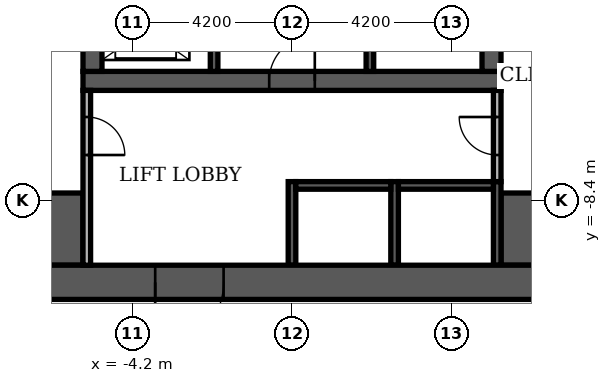
"""IFC4 building model, lengths in metres.
Left out: names, types, materials, properties, quantities, classifications, styles, units other than length and angle.
Written with IfcOpenShell. Run it as: python <this file> out.ifc"""

import sys

from ifc_helpers import new_model, si_unit, direction, frame, frame_2d, origin, place, context, subcontext, project, spatial, rectangle, extrude, element, fill, save


model = new_model("IFC4")
c1 = context("Model", 3, precision=1e-05, world=origin(), true_north=direction((0.0, 1.0)))
c2 = subcontext(c1, "Body", "Model", "MODEL_VIEW")
j1 = project(units=[si_unit("LENGTHUNIT", "METRE"), si_unit("PLANEANGLEUNIT", "RADIAN")], contexts=[c1])
p1 = place(None, origin())
s1 = spatial("IfcSite", under=j1, at=p1, CompositionType="ELEMENT")
p2 = place(p1, origin())
s2 = spatial("IfcBuilding", under=s1, at=p2, CompositionType="ELEMENT")
p3 = place(p2, frame((0.0, 0.0, 16.8)))
s3 = spatial("IfcBuildingStorey", under=s2, at=p3, CompositionType="ELEMENT", Elevation=16.8)
p4 = place(p3, frame((-5.5, -5.25, 0.0), z_axis=(0.0, 0.0, 1.0), x_axis=(1.0, 0.0, 0.0)))
e1 = element("IfcWall", 1, at=p4, inside=s3, PredefinedType="SHEAR", context=c2, shape_type="SweptSolid", body=[
    extrude(rectangle(XDim=11.0, YDim=0.5, at=frame_2d((5.5, 0.0))), origin(), (0.0, 0.0, 1.0), 4.98),
])
p5 = place(p4, frame((4.9, 0.0, 0.0)))
e2 = element("IfcOpeningElement", 2, at=p5, cuts=e1, PredefinedType="OPENING", context=c2, shape_type="SweptSolid", body=[
    extrude(rectangle(XDim=1.2, YDim=2.1, at=frame_2d((0.6, 1.05))), frame((0.0, 0.26, 0.0), z_axis=(0.0, -1.0, 0.0), x_axis=(1.0, 0.0, 0.0)), (0.0, 0.0, 1.0), 0.52),
])
for number, where, z_axis, x_axis in (
    (3, (-5.25, -5.0, 0.0), (0.0, 0.0, 1.0), (0.0, 1.0, 0.0)),
    (4, (5.25, -5.0, 0.0), (0.0, 0.0, 1.0), (0.0, 1.0, 0.0)),
):
    element("IfcWall", number, at=place(p3, frame(where, z_axis=z_axis, x_axis=x_axis)), inside=s3, PredefinedType="SHEAR", context=c2, shape_type="SweptSolid", body=[
        extrude(rectangle(XDim=10.5, YDim=0.5, at=frame_2d((5.25, 0.0))), origin(), (0.0, 0.0, 1.0), 4.98),
    ])
for number, where, z_axis, x_axis in (
    (5, (-10.1, -9.15, 0.0), (0.0, 0.0, 1.0), (1.0, 0.0, 0.0)),
    (6, (5.5, -9.15, 0.0), (0.0, 0.0, 1.0), (1.0, 0.0, 0.0)),
):
    element("IfcWall", number, at=place(p3, frame(where, z_axis=z_axis, x_axis=x_axis)), inside=s3, PredefinedType="SHEAR", context=c2, shape_type="SweptSolid", body=[
        extrude(rectangle(XDim=4.6, YDim=1.9, at=frame_2d((2.3, 0.0))), origin(), (0.0, 0.0, 1.0), 4.98),
    ])
p6 = place(p3, frame((2.05, -5.0, 0.0), z_axis=(0.0, 0.0, 1.0), x_axis=(0.0, 1.0, 0.0)))
e7 = element("IfcWall", 7, at=p6, inside=s3, PredefinedType="SHEAR", context=c2, shape_type="SweptSolid", body=[
    extrude(rectangle(XDim=6.6, YDim=0.2, at=frame_2d((3.3, 0.0))), origin(), (0.0, 0.0, 1.0), 4.98),
])
p7 = place(p6, frame((5.25, 0.0, 0.0)))
e8 = element("IfcOpeningElement", 8, at=p7, cuts=e7, PredefinedType="OPENING", context=c2, shape_type="SweptSolid", body=[
    extrude(rectangle(XDim=1.0, YDim=2.1, at=frame_2d((0.5, 1.05))), frame((0.0, 0.11, 0.0), z_axis=(0.0, -1.0, 0.0), x_axis=(1.0, 0.0, 0.0)), (0.0, 0.0, 1.0), 0.22),
])
for number, where, z_axis, x_axis in (
    (9, (0.0, -10.1, 0.0), (0.0, 0.0, 1.0), (0.0, 1.0, 0.0)),
    (10, (2.7, -10.1, 0.0), (0.0, 0.0, 1.0), (0.0, 1.0, 0.0)),
    (11, (5.4, -10.1, 0.0), (0.0, 0.0, 1.0), (0.0, 1.0, 0.0)),
):
    element("IfcWall", number, at=place(p3, frame(where, z_axis=z_axis, x_axis=x_axis)), inside=s3, PredefinedType="SHEAR", context=c2, shape_type="SweptSolid", body=[
        extrude(rectangle(XDim=2.2, YDim=0.2, at=frame_2d((1.1, 0.0))), origin(), (0.0, 0.0, 1.0), 4.98),
    ])
for number, where, z_axis, x_axis in (
    (12, (0.1, -8.0, 0.0), (0.0, 0.0, 1.0), (1.0, 0.0, 0.0)),
    (13, (2.8, -8.0, 0.0), (0.0, 0.0, 1.0), (1.0, 0.0, 0.0)),
):
    element("IfcWall", number, at=place(p3, frame(where, z_axis=z_axis, x_axis=x_axis)), inside=s3, PredefinedType="SHEAR", context=c2, shape_type="SweptSolid", body=[
        extrude(rectangle(XDim=2.5, YDim=0.2, at=frame_2d((1.25, 0.0))), origin(), (0.0, 0.0, 1.0), 4.98),
    ])
p8 = place(p3, frame((-2.05, -5.0, 0.0), z_axis=(0.0, 0.0, 1.0), x_axis=(0.0, 1.0, 0.0)))
e14 = element("IfcWall", 14, at=p8, inside=s3, PredefinedType="SHEAR", context=c2, shape_type="SweptSolid", body=[
    extrude(rectangle(XDim=3.4, YDim=0.2, at=frame_2d((1.7, 0.0))), origin(), (0.0, 0.0, 1.0), 4.98),
])
p9 = place(p8, frame((0.55, 0.0, 0.0)))
e15 = element("IfcOpeningElement", 15, at=p9, cuts=e14, PredefinedType="OPENING", context=c2, shape_type="SweptSolid", body=[
    extrude(rectangle(XDim=1.1, YDim=2.1, at=frame_2d((0.55, 1.05))), frame((0.0, 0.11, 0.0), z_axis=(0.0, -1.0, 0.0), x_axis=(1.0, 0.0, 0.0)), (0.0, 0.0, 1.0), 0.22),
])
p10 = place(p8, frame((2.45, 0.0, 0.0)))
e16 = element("IfcOpeningElement", 16, at=p10, cuts=e14, PredefinedType="OPENING", context=c2, shape_type="SweptSolid", body=[
    extrude(rectangle(XDim=0.8, YDim=2.1, at=frame_2d((0.4, 1.05))), frame((0.0, 0.11, 0.0), z_axis=(0.0, -1.0, 0.0), x_axis=(1.0, 0.0, 0.0)), (0.0, 0.0, 1.0), 0.22),
])
p11 = place(p3, frame((-11.0, -10.55, 0.0), z_axis=(0.0, 0.0, 1.0), x_axis=(1.0, 0.0, 0.0)))
e17 = element("IfcWall", 17, at=p11, inside=s3, PredefinedType="SHEAR", context=c2, shape_type="SweptSolid", body=[
    extrude(rectangle(XDim=22.0, YDim=0.9, at=frame_2d((11.0, 0.0))), origin(), (0.0, 0.0, 1.0), 4.98),
])
p12 = place(p11, frame((7.4, 0.0, 0.0)))
e18 = element("IfcOpeningElement", 18, at=p12, cuts=e17, PredefinedType="OPENING", context=c2, shape_type="SweptSolid", body=[
    extrude(rectangle(XDim=1.8, YDim=2.2, at=frame_2d((0.9, 1.1))), frame((0.0, 0.46, 0.0), z_axis=(0.0, -1.0, 0.0), x_axis=(1.0, 0.0, 0.0)), (0.0, 0.0, 1.0), 0.92),
])
p13 = place(p3, frame((-5.4, -10.1, 0.0), z_axis=(0.0, 0.0, 1.0), x_axis=(0.0, 1.0, 0.0)))
e19 = element("IfcWall", 19, at=p13, inside=s3, PredefinedType="PARTITIONING", context=c2, shape_type="SweptSolid", body=[
    extrude(rectangle(XDim=4.6, YDim=0.2, at=frame_2d((2.3, 0.0))), origin(), (0.0, 0.0, 1.0), 4.98),
])
p14 = place(p13, frame((2.9, 0.0, 0.0)))
e20 = element("IfcOpeningElement", 20, at=p14, cuts=e19, PredefinedType="OPENING", context=c2, shape_type="SweptSolid", body=[
    extrude(rectangle(XDim=1.0, YDim=2.1, at=frame_2d((0.5, 1.05))), frame((0.0, 0.11, 0.0), z_axis=(0.0, -1.0, 0.0), x_axis=(1.0, 0.0, 0.0)), (0.0, 0.0, 1.0), 0.22),
])
p15 = place(p3, frame((5.4, -7.9, 0.0), z_axis=(0.0, 0.0, 1.0), x_axis=(0.0, 1.0, 0.0)))
e21 = element("IfcWall", 21, at=p15, inside=s3, PredefinedType="PARTITIONING", context=c2, shape_type="SweptSolid", body=[
    extrude(rectangle(XDim=2.4, YDim=0.2, at=frame_2d((1.2, 0.0))), origin(), (0.0, 0.0, 1.0), 4.98),
])
p16 = place(p15, frame((0.7, 0.0, 0.0)))
e22 = element("IfcOpeningElement", 22, at=p16, cuts=e21, PredefinedType="OPENING", context=c2, shape_type="SweptSolid", body=[
    extrude(rectangle(XDim=1.0, YDim=2.1, at=frame_2d((0.5, 1.05))), frame((0.0, 0.11, 0.0), z_axis=(0.0, -1.0, 0.0), x_axis=(1.0, 0.0, 0.0)), (0.0, 0.0, 1.0), 0.22),
])
p17 = place(p5, origin())
e23 = element("IfcDoor", 23, at=p17, inside=s3, OperationType="SINGLE_SWING_RIGHT", PredefinedType="DOOR", context=c2, shape_type="SweptSolid", body=[
    extrude(rectangle(XDim=1.2, YDim=2.1, at=frame_2d((0.6, 1.05))), frame((0.0, 0.025, 0.0), z_axis=(0.0, -1.0, 0.0), x_axis=(1.0, 0.0, 0.0)), (0.0, 0.0, 1.0), 0.05),
])
fill(e2, e23)
p18 = place(p14, frame((1.0, 0.0, 0.0), z_axis=(0.0, 0.0, 1.0), x_axis=(-1.0, 0.0, 0.0)))
e24 = element("IfcDoor", 24, at=p18, inside=s3, OperationType="SINGLE_SWING_LEFT", PredefinedType="DOOR", context=c2, shape_type="SweptSolid", body=[
    extrude(rectangle(XDim=1.0, YDim=2.1, at=frame_2d((0.5, 1.05))), frame((0.0, 0.025, 0.0), z_axis=(0.0, -1.0, 0.0), x_axis=(1.0, 0.0, 0.0)), (0.0, 0.0, 1.0), 0.05),
])
fill(e20, e24)
p19 = place(p16, origin())
e25 = element("IfcDoor", 25, at=p19, inside=s3, OperationType="SINGLE_SWING_RIGHT", PredefinedType="DOOR", context=c2, shape_type="SweptSolid", body=[
    extrude(rectangle(XDim=1.0, YDim=2.1, at=frame_2d((0.5, 1.05))), frame((0.0, 0.025, 0.0), z_axis=(0.0, -1.0, 0.0), x_axis=(1.0, 0.0, 0.0)), (0.0, 0.0, 1.0), 0.05),
])
fill(e22, e25)
p20 = place(p12, frame((1.8, 0.0, 0.0), z_axis=(0.0, 0.0, 1.0), x_axis=(-1.0, 0.0, 0.0)))
e26 = element("IfcDoor", 26, at=p20, inside=s3, OperationType="DOUBLE_DOOR_SINGLE_SWING", PredefinedType="DOOR", context=c2, shape_type="SweptSolid", body=[
    extrude(rectangle(XDim=1.8, YDim=2.2, at=frame_2d((0.9, 1.1))), frame((0.0, 0.025, 0.0), z_axis=(0.0, -1.0, 0.0), x_axis=(1.0, 0.0, 0.0)), (0.0, 0.0, 1.0), 0.05),
])
fill(e18, e26)
save(model, sys.argv[1])
